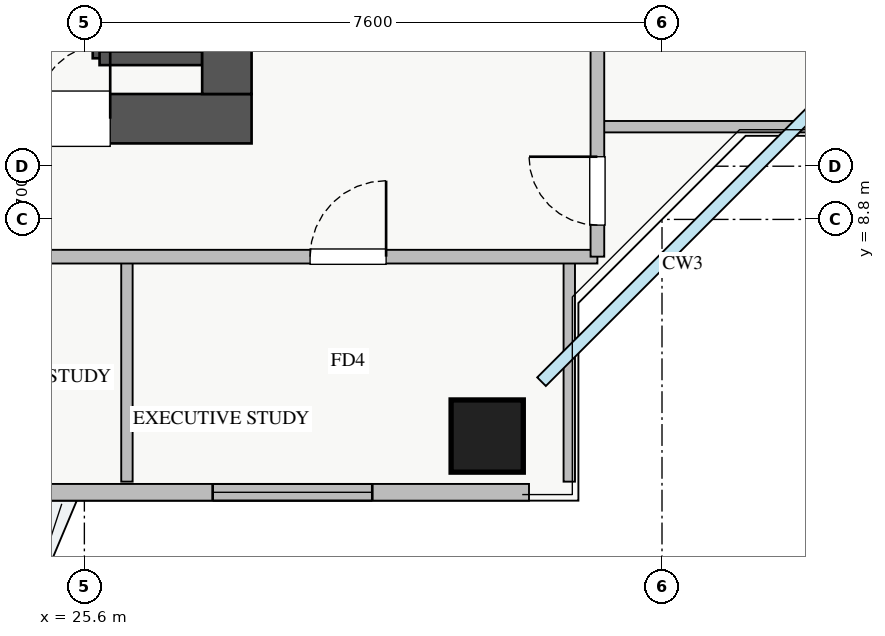
"""IFC4 building model, lengths in metres.
Left out: names, types, materials, properties, quantities, classifications, styles, units other than length and angle.
Written with IfcOpenShell. Run it as: python <this file> out.ifc"""

import sys

from ifc_helpers import new_model, si_unit, direction, frame, frame_2d, origin, origin_2d, place, context, subcontext, project, spatial, rectangle, extrude, source, transform, mapped, element, fill, save


model = new_model("IFC4")
c1 = context("Model", 3, precision=1e-05, world=origin(), true_north=direction((0.0, 1.0)))
c2 = subcontext(c1, "Body", "Model", "MODEL_VIEW")
j1 = project(units=[si_unit("LENGTHUNIT", "METRE"), si_unit("PLANEANGLEUNIT", "RADIAN")], contexts=[c1])
p1 = place(None, origin())
s1 = spatial("IfcSite", under=j1, at=p1, CompositionType="ELEMENT")
p2 = place(p1, origin())
s2 = spatial("IfcBuilding", under=s1, at=p2, CompositionType="ELEMENT")
p3 = place(p2, frame((0.0, 0.0, 179.5)))
s3 = spatial("IfcBuildingStorey", under=s2, at=p3, CompositionType="ELEMENT", Elevation=179.5)
p4 = place(p3, frame((25.8, 10.92, 0.0), z_axis=(0.0, 0.0, 1.0), x_axis=(0.0, 1.0, 0.0)))
e1 = element("IfcWall", 1, at=p4, inside=s3, PredefinedType="SHEAR", context=c2, shape_type="SweptSolid", body=[
    extrude(rectangle(XDim=1.06, YDim=0.18, at=frame_2d((0.53, 0.0))), origin(), (0.0, 0.0, 1.0), 3.07),
])
p5 = place(p3, frame((25.8, 10.92, 0.0), z_axis=(0.0, 0.0, 1.0), x_axis=(1.0, 0.0, 0.0)))
e2 = element("IfcWall", 2, at=p5, inside=s3, PredefinedType="SHEAR", context=c2, shape_type="SweptSolid", body=[
    extrude(rectangle(XDim=1.35, YDim=0.18, at=frame_2d((0.675, 0.0))), origin(), (0.0, 0.0, 1.0), 3.07),
])
p6 = place(p3, frame((10.2, 10.125, 0.0), z_axis=(0.0, 0.0, 1.0), x_axis=(1.0, 0.0, 0.0)))
e3 = element("IfcWall", 3, at=p6, inside=s3, PredefinedType="SHEAR", context=c2, shape_type="SweptSolid", body=[
    extrude(rectangle(XDim=17.6, YDim=0.65, at=frame_2d((8.8, 0.0))), origin(), (0.0, 0.0, 1.0), 3.25),
])
p7 = place(p6, frame((1.15, 0.0, 0.0)))
e4 = element("IfcOpeningElement", 4, at=p7, cuts=e3, PredefinedType="OPENING", context=c2, shape_type="SweptSolid", body=[
    extrude(rectangle(XDim=1.1, YDim=2.05, at=frame_2d((0.55, 1.025))), frame((0.0, 0.335, 0.0), z_axis=(0.0, -1.0, 0.0), x_axis=(1.0, 0.0, 0.0)), (0.0, 0.0, 1.0), 0.67),
])
p8 = place(p6, frame((8.3, 0.0, 0.0)))
e5 = element("IfcOpeningElement", 5, at=p8, cuts=e3, PredefinedType="OPENING", context=c2, shape_type="SweptSolid", body=[
    extrude(rectangle(XDim=1.1, YDim=2.05, at=frame_2d((0.55, 1.025))), frame((0.0, 0.335, 0.0), z_axis=(0.0, -1.0, 0.0), x_axis=(1.0, 0.0, 0.0)), (0.0, 0.0, 1.0), 0.67),
])
p9 = place(p6, frame((4.9, 0.0, 0.0)))
e6 = element("IfcOpeningElement", 6, at=p9, cuts=e3, PredefinedType="OPENING", context=c2, shape_type="SweptSolid", body=[
    extrude(rectangle(XDim=1.1, YDim=2.05, at=frame_2d((0.55, 1.025))), frame((0.0, 0.335, 0.0), z_axis=(0.0, -1.0, 0.0), x_axis=(1.0, 0.0, 0.0)), (0.0, 0.0, 1.0), 0.67),
])
p10 = place(p6, frame((14.74, 0.0, 0.0)))
e7 = element("IfcOpeningElement", 7, at=p10, cuts=e3, PredefinedType="OPENING", context=c2, shape_type="SweptSolid", body=[
    extrude(rectangle(XDim=1.0, YDim=2.05, at=frame_2d((0.5, 1.025))), frame((0.0, 0.335, 0.0), z_axis=(0.0, -1.0, 0.0), x_axis=(1.0, 0.0, 0.0)), (0.0, 0.0, 1.0), 0.67),
])
p11 = place(p6, frame((10.64, 0.0, 0.0)))
e8 = element("IfcOpeningElement", 8, at=p11, cuts=e3, PredefinedType="OPENING", context=c2, shape_type="SweptSolid", body=[
    extrude(rectangle(XDim=1.0, YDim=2.05, at=frame_2d((0.5, 1.025))), frame((0.0, 0.335, 0.0), z_axis=(0.0, -1.0, 0.0), x_axis=(1.0, 0.0, 0.0)), (0.0, 0.0, 1.0), 0.67),
])
p12 = place(p6, frame((13.09, 0.0, 0.0)))
e9 = element("IfcOpeningElement", 9, at=p12, cuts=e3, PredefinedType="OPENING", context=c2, shape_type="SweptSolid", body=[
    extrude(rectangle(XDim=1.0, YDim=2.05, at=frame_2d((0.5, 1.025))), frame((0.0, 0.335, 0.0), z_axis=(0.0, -1.0, 0.0), x_axis=(1.0, 0.0, 0.0)), (0.0, 0.0, 1.0), 0.67),
])
p13 = place(p3, frame((27.475, 10.45, 0.0), z_axis=(0.0, 0.0, 1.0), x_axis=(0.0, 1.0, 0.0)))
e10 = element("IfcWall", 10, at=p13, inside=s3, PredefinedType="SHEAR", context=c2, shape_type="SweptSolid", body=[
    extrude(rectangle(XDim=5.9, YDim=0.65, at=frame_2d((2.95, 0.0))), origin(), (0.0, 0.0, 1.0), 3.25),
])
p14 = place(p13, frame((2.1, 0.0, 0.0)))
e11 = element("IfcOpeningElement", 11, at=p14, cuts=e10, PredefinedType="OPENING", context=c2, shape_type="SweptSolid", body=[
    extrude(rectangle(XDim=1.3, YDim=2.05, at=frame_2d((0.65, 1.025))), frame((0.0, 0.335, 0.0), z_axis=(0.0, -1.0, 0.0), x_axis=(1.0, 0.0, 0.0)), (0.0, 0.0, 1.0), 0.67),
])
m1 = source(origin(), c2, "Body", "SweptSolid", [
    extrude(rectangle(XDim=0.95, YDim=0.95, at=origin_2d()), origin(), (0.0, 0.0, 1.0), 3.25),
])
p15 = place(p3, frame((30.9, 5.95, 0.0), z_axis=(0.0, 0.0, 1.0), x_axis=(1.0, 0.0, 0.0)))
e12 = element("IfcColumn", 12, at=p15, inside=s3, PredefinedType="COLUMN", context=c2, shape_type="MappedRepresentation", body=[
    mapped(m1, transform((0.0, 0.0, 0.0), x_axis=(1.0, 0.0, 0.0), y_axis=(0.0, 1.0, 0.0), z_axis=(0.0, 0.0, 1.0), scale=1.0)),
])
p16 = place(p3, frame((6.55, 5.21, 0.0), z_axis=(0.0, 0.0, 1.0), x_axis=(1.0, 0.0, 0.0)))
e13 = element("IfcWall", 13, at=p16, inside=s3, PredefinedType="STANDARD", context=c2, shape_type="SweptSolid", body=[
    extrude(rectangle(XDim=24.9, YDim=0.22, at=frame_2d((12.45, 0.0))), origin(), (0.0, 0.0, 1.0), 2.61),
])
p17 = place(p16, frame((13.3, 0.0, 0.0)))
e14 = element("IfcOpeningElement", 14, at=p17, cuts=e13, PredefinedType="OPENING", context=c2, shape_type="SweptSolid", body=[
    extrude(rectangle(XDim=1.2, YDim=2.1, at=frame_2d((0.6, 1.05))), frame((0.0, 0.12, 0.0), z_axis=(0.0, -1.0, 0.0), x_axis=(1.0, 0.0, 0.0)), (0.0, 0.0, 1.0), 0.24),
])
p18 = place(p16, frame((3.455, 0.0, 0.9)))
e15 = element("IfcOpeningElement", 15, at=p18, cuts=e13, PredefinedType="OPENING", context=c2, shape_type="SweptSolid", body=[
    extrude(rectangle(XDim=2.4, YDim=1.5, at=frame_2d((1.2, 0.75))), frame((0.0, 0.12, 0.0), z_axis=(0.0, -1.0, 0.0), x_axis=(1.0, 0.0, 0.0)), (0.0, 0.0, 1.0), 0.24),
])
p19 = place(p16, frame((8.438, 0.0, 0.9)))
e16 = element("IfcOpeningElement", 16, at=p19, cuts=e13, PredefinedType="OPENING", context=c2, shape_type="SweptSolid", body=[
    extrude(rectangle(XDim=1.8, YDim=1.45, at=frame_2d((0.9, 0.725))), frame((0.0, 0.12, 0.0), z_axis=(0.0, -1.0, 0.0), x_axis=(1.0, 0.0, 0.0)), (0.0, 0.0, 1.0), 0.24),
])
p20 = place(p16, frame((14.813, 0.0, 0.9)))
e17 = element("IfcOpeningElement", 17, at=p20, cuts=e13, PredefinedType="OPENING", context=c2, shape_type="SweptSolid", body=[
    extrude(rectangle(XDim=1.5, YDim=1.45, at=frame_2d((0.75, 0.725))), frame((0.0, 0.12, 0.0), z_axis=(0.0, -1.0, 0.0), x_axis=(1.0, 0.0, 0.0)), (0.0, 0.0, 1.0), 0.24),
])
p21 = place(p16, frame((20.738, 0.0, 0.9)))
e18 = element("IfcOpeningElement", 18, at=p21, cuts=e13, PredefinedType="OPENING", context=c2, shape_type="SweptSolid", body=[
    extrude(rectangle(XDim=2.1, YDim=1.48, at=frame_2d((1.05, 0.74))), frame((0.0, 0.12, 0.0), z_axis=(0.0, -1.0, 0.0), x_axis=(1.0, 0.0, 0.0)), (0.0, 0.0, 1.0), 0.24),
])
for number, where, z_axis, x_axis in (
    (19, (26.16, 5.35, 0.0), (0.0, 0.0, 1.0), (0.0, 1.0, 0.0)),
    (20, (31.98, 5.35, 0.0), (0.0, 0.0, 1.0), (0.0, 1.0, 0.0)),
):
    element("IfcWall", number, at=place(p3, frame(where, z_axis=z_axis, x_axis=x_axis)), inside=s3, PredefinedType="PARTITIONING", context=c2, shape_type="SweptSolid", body=[
        extrude(rectangle(XDim=2.96, YDim=0.15, at=frame_2d((1.48, 0.0))), origin(), (0.0, 0.0, 1.0), 3.07),
    ])
p22 = place(p3, frame((8.72, 8.31, 0.0), z_axis=(0.0, 0.0, 1.0), x_axis=(1.0, 0.0, 0.0)))
e21 = element("IfcWall", 21, at=p22, inside=s3, PredefinedType="PARTITIONING", context=c2, shape_type="SweptSolid", body=[
    extrude(rectangle(XDim=23.63, YDim=0.18, at=frame_2d((11.815, 0.0))), origin(), (0.0, 0.0, 1.0), 3.07),
])
p23 = place(p22, frame((1.985, 0.0, 0.0)))
e22 = element("IfcOpeningElement", 22, at=p23, cuts=e21, PredefinedType="OPENING", context=c2, shape_type="SweptSolid", body=[
    extrude(rectangle(XDim=1.0, YDim=2.05, at=frame_2d((0.5, 1.025))), frame((0.0, 0.1, 0.0), z_axis=(0.0, -1.0, 0.0), x_axis=(1.0, 0.0, 0.0)), (0.0, 0.0, 1.0), 0.2),
])
p24 = place(p22, frame((7.175, 0.0, 0.0)))
e23 = element("IfcOpeningElement", 23, at=p24, cuts=e21, PredefinedType="OPENING", context=c2, shape_type="SweptSolid", body=[
    extrude(rectangle(XDim=1.0, YDim=2.05, at=frame_2d((0.5, 1.025))), frame((0.0, 0.1, 0.0), z_axis=(0.0, -1.0, 0.0), x_axis=(1.0, 0.0, 0.0)), (0.0, 0.0, 1.0), 0.2),
])
p25 = place(p22, frame((13.41, 0.0, 0.0)))
e24 = element("IfcOpeningElement", 24, at=p25, cuts=e21, PredefinedType="OPENING", context=c2, shape_type="SweptSolid", body=[
    extrude(rectangle(XDim=1.0, YDim=2.05, at=frame_2d((0.5, 1.025))), frame((0.0, 0.1, 0.0), z_axis=(0.0, -1.0, 0.0), x_axis=(1.0, 0.0, 0.0)), (0.0, 0.0, 1.0), 0.2),
])
p26 = place(p22, frame((19.85, 0.0, 0.0)))
e25 = element("IfcOpeningElement", 25, at=p26, cuts=e21, PredefinedType="OPENING", context=c2, shape_type="SweptSolid", body=[
    extrude(rectangle(XDim=1.0, YDim=2.05, at=frame_2d((0.5, 1.025))), frame((0.0, 0.1, 0.0), z_axis=(0.0, -1.0, 0.0), x_axis=(1.0, 0.0, 0.0)), (0.0, 0.0, 1.0), 0.2),
])
p27 = place(p3, frame((32.35, 10.02, 0.0), z_axis=(0.0, 0.0, 1.0), x_axis=(1.0, 0.0, 0.0)))
e26 = element("IfcWall", 26, at=p27, inside=s3, PredefinedType="PARTITIONING", context=c2, shape_type="SweptSolid", body=[
    extrude(rectangle(XDim=4.3, YDim=0.15, at=frame_2d((2.15, 0.0))), origin(), (0.0, 0.0, 1.0), 3.07),
])
p28 = place(p3, frame((32.35, 8.31, 0.0), z_axis=(0.0, 0.0, 1.0), x_axis=(0.0, 1.0, 0.0)))
e27 = element("IfcWall", 27, at=p28, inside=s3, PredefinedType="PARTITIONING", context=c2, shape_type="SweptSolid", body=[
    extrude(rectangle(XDim=29.37, YDim=0.18, at=frame_2d((14.685, 0.0))), origin(), (0.0, 0.0, 1.0), 3.07),
])
p29 = place(p28, frame((28.06, 0.0, 0.0)))
e28 = element("IfcOpeningElement", 28, at=p29, cuts=e27, PredefinedType="OPENING", context=c2, shape_type="SweptSolid", body=[
    extrude(rectangle(XDim=0.9, YDim=2.05, at=frame_2d((0.45, 1.025))), frame((0.0, 0.1, 0.0), z_axis=(0.0, -1.0, 0.0), x_axis=(1.0, 0.0, 0.0)), (0.0, 0.0, 1.0), 0.2),
])
p30 = place(p28, frame((0.415, 0.0, 0.0)))
e29 = element("IfcOpeningElement", 29, at=p30, cuts=e27, PredefinedType="OPENING", context=c2, shape_type="SweptSolid", body=[
    extrude(rectangle(XDim=0.9, YDim=2.05, at=frame_2d((0.45, 1.025))), frame((0.0, 0.1, 0.0), z_axis=(0.0, -1.0, 0.0), x_axis=(1.0, 0.0, 0.0)), (0.0, 0.0, 1.0), 0.2),
])
p31 = place(p28, frame((3.58, 0.0, 0.0)))
e30 = element("IfcOpeningElement", 30, at=p31, cuts=e27, PredefinedType="OPENING", context=c2, shape_type="SweptSolid", body=[
    extrude(rectangle(XDim=1.0, YDim=2.05, at=frame_2d((0.5, 1.025))), frame((0.0, 0.1, 0.0), z_axis=(0.0, -1.0, 0.0), x_axis=(1.0, 0.0, 0.0)), (0.0, 0.0, 1.0), 0.2),
])
p32 = place(p28, frame((12.305, 0.0, 0.0)))
e31 = element("IfcOpeningElement", 31, at=p32, cuts=e27, PredefinedType="OPENING", context=c2, shape_type="SweptSolid", body=[
    extrude(rectangle(XDim=1.0, YDim=2.05, at=frame_2d((0.5, 1.025))), frame((0.0, 0.1, 0.0), z_axis=(0.0, -1.0, 0.0), x_axis=(1.0, 0.0, 0.0)), (0.0, 0.0, 1.0), 0.2),
])
p33 = place(p28, frame((20.835, 0.0, 0.0)))
e32 = element("IfcOpeningElement", 32, at=p33, cuts=e27, PredefinedType="OPENING", context=c2, shape_type="SweptSolid", body=[
    extrude(rectangle(XDim=1.0, YDim=2.05, at=frame_2d((0.5, 1.025))), frame((0.0, 0.1, 0.0), z_axis=(0.0, -1.0, 0.0), x_axis=(1.0, 0.0, 0.0)), (0.0, 0.0, 1.0), 0.2),
])
m2 = source(origin(), c2, "Body", "SweptSolid", [
    extrude(rectangle(XDim=2.1, YDim=1.48, at=frame_2d((1.05, 0.74))), frame((0.0, 0.03, 0.0), z_axis=(0.0, -1.0, 0.0), x_axis=(1.0, 0.0, 0.0)), (0.0, 0.0, 1.0), 0.06),
])
p34 = place(p21, origin())
e33 = element("IfcWindow", 33, at=p34, inside=s3, PartitioningType="TRIPLE_PANEL_VERTICAL", PredefinedType="WINDOW", context=c2, shape_type="MappedRepresentation", body=[
    mapped(m2, transform((0.0, 0.0, 0.0), x_axis=(1.0, 0.0, 0.0), y_axis=(0.0, 1.0, 0.0), z_axis=(0.0, 0.0, 1.0), scale=1.0)),
])
fill(e18, e33)
m3 = source(origin(), c2, "Body", "SweptSolid", [
    extrude(rectangle(XDim=1.0, YDim=2.05, at=frame_2d((0.5, 1.025))), frame((0.0, 0.025, 0.0), z_axis=(0.0, -1.0, 0.0), x_axis=(1.0, 0.0, 0.0)), (0.0, 0.0, 1.0), 0.05),
])
p35 = place(p10, origin())
e34 = element("IfcDoor", 34, at=p35, inside=s3, OperationType="SINGLE_SWING_RIGHT", PredefinedType="DOOR", context=c2, shape_type="MappedRepresentation", body=[
    mapped(m3, transform((0.0, 0.0, 0.0), x_axis=(1.0, 0.0, 0.0), y_axis=(0.0, 1.0, 0.0), z_axis=(0.0, 0.0, 1.0), scale=1.0)),
])
fill(e7, e34)
p36 = place(p26, origin())
e35 = element("IfcDoor", 35, at=p36, inside=s3, OperationType="SINGLE_SWING_RIGHT", PredefinedType="DOOR", context=c2, shape_type="MappedRepresentation", body=[
    mapped(m3, transform((0.0, 0.0, 0.0), x_axis=(1.0, 0.0, 0.0), y_axis=(0.0, 1.0, 0.0), z_axis=(0.0, 0.0, 1.0), scale=1.0)),
])
fill(e25, e35)
m4 = source(origin(), c2, "Body", "SweptSolid", [
    extrude(rectangle(XDim=0.9, YDim=2.05, at=frame_2d((0.45, 1.025))), frame((0.0, 0.025, 0.0), z_axis=(0.0, -1.0, 0.0), x_axis=(1.0, 0.0, 0.0)), (0.0, 0.0, 1.0), 0.05),
])
p37 = place(p30, origin())
e36 = element("IfcDoor", 36, at=p37, inside=s3, OperationType="SINGLE_SWING_RIGHT", PredefinedType="DOOR", context=c2, shape_type="MappedRepresentation", body=[
    mapped(m4, transform((0.0, 0.0, 0.0), x_axis=(1.0, 0.0, 0.0), y_axis=(0.0, 1.0, 0.0), z_axis=(0.0, 0.0, 1.0), scale=1.0)),
])
fill(e29, e36)
save(model, sys.argv[1])
